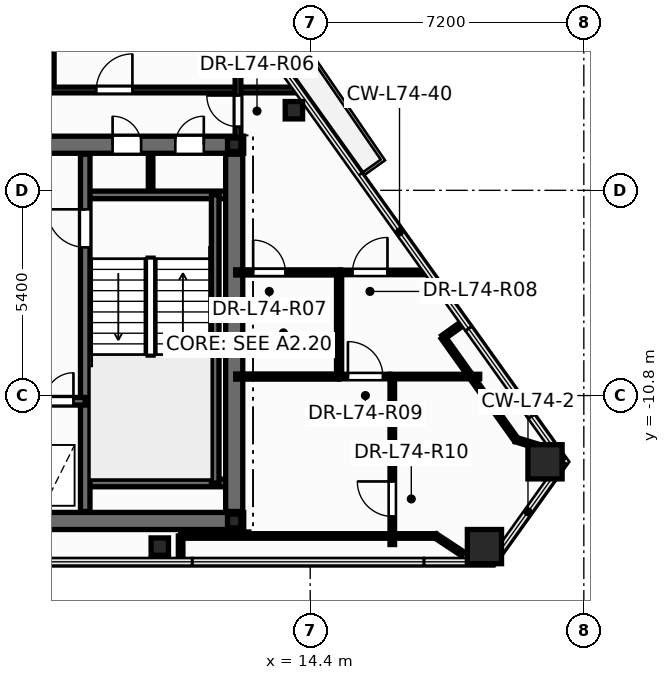
"""IFC4 building model, lengths in metres.
Left out: names, types, materials, properties, quantities, classifications, styles, units other than length and angle.
Written with IfcOpenShell. Run it as: python <this file> out.ifc"""

import sys

from ifc_helpers import new_model, si_unit, direction, frame, frame_2d, origin, origin_2d, place, context, subcontext, project, spatial, rectangle, hollow_rectangle, hollow_circle, i_section, extrude, element, fill, save


model = new_model("IFC4")
c1 = context("Model", 3, precision=1e-05, world=origin(), true_north=direction((0.0, 1.0)))
c2 = subcontext(c1, "Body", "Model", "MODEL_VIEW")
j1 = project(units=[si_unit("LENGTHUNIT", "METRE"), si_unit("PLANEANGLEUNIT", "RADIAN")], contexts=[c1])
p1 = place(None, origin())
s1 = spatial("IfcSite", under=j1, at=p1, CompositionType="ELEMENT")
p2 = place(p1, origin())
s2 = spatial("IfcBuilding", under=s1, at=p2, CompositionType="ELEMENT")
p3 = place(p2, frame((0.0, 0.0, 281.4)))
s3 = spatial("IfcBuildingStorey", under=s2, at=p3, CompositionType="ELEMENT", Elevation=281.4)
for number, where, z_axis, x_axis in (
    (1, (18.985, -14.774, 0.0), (0.0, 0.0, 1.0), (1.0, 0.0, 0.0)),
    (2, (20.579, -12.543, 0.0), (0.0, 0.0, 1.0), (1.0, 0.0, 0.0)),
):
    element("IfcColumn", number, at=place(p3, frame(where, z_axis=z_axis, x_axis=x_axis)), inside=s3, PredefinedType="COLUMN", context=c2, shape_type="SweptSolid", body=[
        extrude(hollow_rectangle(XDim=0.9, YDim=0.9, WallThickness=0.04, at=origin_2d()), origin(), (0.0, 0.0, 1.0), 3.6),
    ])
for number, where, z_axis, x_axis in (
    (3, (10.442, -14.774, 0.0), (0.0, 0.0, 1.0), (1.0, 0.0, 0.0)),
    (4, (13.97, -3.292, 0.0), (0.0, 0.0, 1.0), (1.0, 0.0, 0.0)),
):
    element("IfcColumn", number, at=place(p3, frame(where, z_axis=z_axis, x_axis=x_axis)), inside=s3, PredefinedType="COLUMN", context=c2, shape_type="SweptSolid", body=[
        extrude(hollow_circle(Radius=0.229, WallThickness=0.016, at=origin_2d()), origin(), (0.0, 0.0, 1.0), 3.6),
    ])
for number, where, z_axis, x_axis in (
    (5, (12.4, -14.1, 0.0), (0.0, 0.0, 1.0), (1.0, 0.0, 0.0)),
    (6, (12.4, -4.2, 0.0), (0.0, 0.0, 1.0), (1.0, 0.0, 0.0)),
):
    element("IfcColumn", number, at=place(p3, frame(where, z_axis=z_axis, x_axis=x_axis)), inside=s3, PredefinedType="COLUMN", context=c2, shape_type="SweptSolid", body=[
        extrude(i_section(OverallWidth=0.352, OverallDepth=0.359, WebThickness=0.018, FlangeThickness=0.026, at=origin_2d()), origin(), (0.0, 0.0, 1.0), 3.6),
    ])
p4 = place(p3, frame((10.2, -5.52, 0.0), z_axis=(0.0, 0.0, 1.0), x_axis=(0.0, 1.0, 0.0)))
e7 = element("IfcWall", 7, at=p4, inside=s3, PredefinedType="PARTITIONING", context=c2, shape_type="SweptSolid", body=[
    extrude(rectangle(XDim=1.12, YDim=0.12, at=frame_2d((0.56, 0.0))), origin(), (0.0, 0.0, 1.0), 3.32),
])
p5 = place(p3, frame((-12.65, -14.1, 0.0), z_axis=(0.0, 0.0, 1.0), x_axis=(1.0, 0.0, 0.0)))
e8 = element("IfcWall", 8, at=p5, inside=s3, PredefinedType="SHEAR", context=c2, shape_type="SweptSolid", body=[
    extrude(rectangle(XDim=25.3, YDim=0.45, at=frame_2d((12.65, 0.0))), origin(), (0.0, 0.0, 1.0), 3.6),
])
p6 = place(p3, frame((-12.65, -4.2, 0.0), z_axis=(0.0, 0.0, 1.0), x_axis=(1.0, 0.0, 0.0)))
e9 = element("IfcWall", 9, at=p6, inside=s3, PredefinedType="SHEAR", context=c2, shape_type="SweptSolid", body=[
    extrude(rectangle(XDim=25.3, YDim=0.45, at=frame_2d((12.65, 0.0))), origin(), (0.0, 0.0, 1.0), 3.6),
])
p7 = place(p6, frame((0.95, 0.0, 0.0)))
e10 = element("IfcOpeningElement", 10, at=p7, cuts=e9, PredefinedType="OPENING", context=c2, shape_type="SweptSolid", body=[
    extrude(rectangle(XDim=0.756, YDim=2.054, at=frame_2d((0.375, 1.027))), frame((0.0, 0.235, 0.0), z_axis=(0.0, -1.0, 0.0), x_axis=(1.0, 0.0, 0.0)), (0.0, 0.0, 1.0), 0.47),
])
p8 = place(p6, frame((2.6, 0.0, 0.0)))
e11 = element("IfcOpeningElement", 11, at=p8, cuts=e9, PredefinedType="OPENING", context=c2, shape_type="SweptSolid", body=[
    extrude(rectangle(XDim=0.756, YDim=2.054, at=frame_2d((0.375, 1.027))), frame((0.0, 0.235, 0.0), z_axis=(0.0, -1.0, 0.0), x_axis=(1.0, 0.0, 0.0)), (0.0, 0.0, 1.0), 0.47),
])
p9 = place(p6, frame((21.85, 0.0, 0.0)))
e12 = element("IfcOpeningElement", 12, at=p9, cuts=e9, PredefinedType="OPENING", context=c2, shape_type="SweptSolid", body=[
    extrude(rectangle(XDim=0.756, YDim=2.054, at=frame_2d((0.375, 1.027))), frame((0.0, 0.235, 0.0), z_axis=(0.0, -1.0, 0.0), x_axis=(1.0, 0.0, 0.0)), (0.0, 0.0, 1.0), 0.47),
])
p10 = place(p6, frame((23.5, 0.0, 0.0)))
e13 = element("IfcOpeningElement", 13, at=p10, cuts=e9, PredefinedType="OPENING", context=c2, shape_type="SweptSolid", body=[
    extrude(rectangle(XDim=0.756, YDim=2.054, at=frame_2d((0.375, 1.027))), frame((0.0, 0.235, 0.0), z_axis=(0.0, -1.0, 0.0), x_axis=(1.0, 0.0, 0.0)), (0.0, 0.0, 1.0), 0.47),
])
p11 = place(p6, frame((5.85, 0.0, 0.0)))
e14 = element("IfcOpeningElement", 14, at=p11, cuts=e9, PredefinedType="OPENING", context=c2, shape_type="SweptSolid", body=[
    extrude(rectangle(XDim=1.006, YDim=2.104, at=frame_2d((0.5, 1.052))), frame((0.0, 0.235, 0.0), z_axis=(0.0, -1.0, 0.0), x_axis=(1.0, 0.0, 0.0)), (0.0, 0.0, 1.0), 0.47),
])
p12 = place(p6, frame((10.35, 0.0, 0.0)))
e15 = element("IfcOpeningElement", 15, at=p12, cuts=e9, PredefinedType="OPENING", context=c2, shape_type="SweptSolid", body=[
    extrude(rectangle(XDim=1.406, YDim=2.154, at=frame_2d((0.7, 1.077))), frame((0.0, 0.235, 0.0), z_axis=(0.0, -1.0, 0.0), x_axis=(1.0, 0.0, 0.0)), (0.0, 0.0, 1.0), 0.47),
])
p13 = place(p6, frame((18.45, 0.0, 0.0)))
e16 = element("IfcOpeningElement", 16, at=p13, cuts=e9, PredefinedType="OPENING", context=c2, shape_type="SweptSolid", body=[
    extrude(rectangle(XDim=1.006, YDim=2.104, at=frame_2d((0.5, 1.052))), frame((0.0, 0.235, 0.0), z_axis=(0.0, -1.0, 0.0), x_axis=(1.0, 0.0, 0.0)), (0.0, 0.0, 1.0), 0.47),
])
for number, where, z_axis, x_axis in (
    (17, (8.48, -5.52, 0.0), (0.0, 0.0, 1.0), (1.0, 0.0, 0.0)),
    (18, (8.48, -13.1, 0.0), (0.0, 0.0, 1.0), (1.0, 0.0, 0.0)),
):
    element("IfcWall", number, at=place(p3, frame(where, z_axis=z_axis, x_axis=x_axis)), inside=s3, PredefinedType="SOLIDWALL", context=c2, shape_type="SweptSolid", body=[
        extrude(rectangle(XDim=3.87, YDim=0.2, at=frame_2d((1.935, 0.0))), origin(), (0.0, 0.0, 1.0), 3.6),
    ])
p14 = place(p3, frame((11.9, -13.1, 0.0), z_axis=(0.0, 0.0, 1.0), x_axis=(0.0, 1.0, 0.0)))
e19 = element("IfcWall", 19, at=p14, inside=s3, PredefinedType="SOLIDWALL", context=c2, shape_type="SweptSolid", body=[
    extrude(rectangle(XDim=7.58, YDim=0.2, at=frame_2d((3.79, 0.0))), origin(), (0.0, 0.0, 1.0), 3.6),
])
p15 = place(p3, frame((8.48, -13.85, 0.0), z_axis=(0.0, 0.0, 1.0), x_axis=(0.0, 1.0, 0.0)))
e20 = element("IfcWall", 20, at=p15, inside=s3, PredefinedType="SHEAR", context=c2, shape_type="SweptSolid", body=[
    extrude(rectangle(XDim=9.4, YDim=0.25, at=frame_2d((4.7, 0.0))), origin(), (0.0, 0.0, 1.0), 3.6),
])
p16 = place(p15, frame((6.95, 0.0, 0.0)))
e21 = element("IfcOpeningElement", 21, at=p16, cuts=e20, PredefinedType="OPENING", context=c2, shape_type="SweptSolid", body=[
    extrude(rectangle(XDim=1.006, YDim=2.104, at=frame_2d((0.5, 1.052))), frame((0.0, 0.135, 0.0), z_axis=(0.0, -1.0, 0.0), x_axis=(1.0, 0.0, 0.0)), (0.0, 0.0, 1.0), 0.27),
])
p17 = place(p3, frame((5.12, -10.95, 0.0), z_axis=(0.0, 0.0, 1.0), x_axis=(1.0, 0.0, 0.0)))
e22 = element("IfcWall", 22, at=p17, inside=s3, PredefinedType="SOLIDWALL", context=c2, shape_type="SweptSolid", body=[
    extrude(rectangle(XDim=3.36, YDim=0.2, at=frame_2d((1.68, 0.0))), origin(), (0.0, 0.0, 1.0), 3.6),
])
p18 = place(p17, frame((0.42, 0.0, 0.0)))
e23 = element("IfcOpeningElement", 23, at=p18, cuts=e22, PredefinedType="OPENING", context=c2, shape_type="SweptSolid", body=[
    extrude(rectangle(XDim=1.106, YDim=2.104, at=frame_2d((0.55, 1.052))), frame((0.0, 0.11, 0.0), z_axis=(0.0, -1.0, 0.0), x_axis=(1.0, 0.0, 0.0)), (0.0, 0.0, 1.0), 0.22),
])
p19 = place(p17, frame((2.3, 0.0, 0.0)))
e24 = element("IfcOpeningElement", 24, at=p19, cuts=e22, PredefinedType="OPENING", context=c2, shape_type="SweptSolid", body=[
    extrude(rectangle(XDim=0.756, YDim=2.054, at=frame_2d((0.375, 1.027))), frame((0.0, 0.11, 0.0), z_axis=(0.0, -1.0, 0.0), x_axis=(1.0, 0.0, 0.0)), (0.0, 0.0, 1.0), 0.22),
])
p20 = place(p3, frame((12.4, -13.85, 0.0), z_axis=(0.0, 0.0, 1.0), x_axis=(0.0, 1.0, 0.0)))
e25 = element("IfcWall", 25, at=p20, inside=s3, PredefinedType="SHEAR", context=c2, shape_type="SweptSolid", body=[
    extrude(rectangle(XDim=9.4, YDim=0.45, at=frame_2d((4.7, 0.0))), origin(), (0.0, 0.0, 1.0), 3.6),
])
p21 = place(p3, frame((7.6, -2.76, 0.0), z_axis=(0.0, 0.0, 1.0), x_axis=(0.0, 1.0, 0.0)))
e26 = element("IfcWall", 26, at=p21, inside=s3, PredefinedType="PARTITIONING", context=c2, shape_type="SweptSolid", body=[
    extrude(rectangle(XDim=9.075, YDim=0.12, at=frame_2d((4.538, 0.0))), origin(), (0.0, 0.0, 1.0), 2.693),
])
p22 = place(p3, frame((10.99, -14.494, 0.0), z_axis=(0.0, 0.0, 1.0), x_axis=(1.0, 0.0, 0.0)))
e27 = element("IfcWall", 27, at=p22, inside=s3, PredefinedType="PARTITIONING", context=c2, shape_type="SweptSolid", body=[
    extrude(rectangle(XDim=6.712, YDim=0.12, at=frame_2d((3.356, 0.0))), origin(), (0.0, 0.0, 1.0), 2.838),
])
p23 = place(p3, frame((7.54, -2.76, 0.0), z_axis=(0.0, 0.0, 1.0), x_axis=(1.0, 0.0, 0.0)))
e28 = element("IfcWall", 28, at=p23, inside=s3, PredefinedType="PARTITIONING", context=c2, shape_type="SweptSolid", body=[
    extrude(rectangle(XDim=6.542, YDim=0.15, at=frame_2d((3.271, 0.0))), origin(), (0.0, 0.0, 1.0), 2.693),
])
p24 = place(p23, frame((1.231, 0.0, 0.0)))
e29 = element("IfcOpeningElement", 29, at=p24, cuts=e28, PredefinedType="OPENING", context=c2, shape_type="SweptSolid", body=[
    extrude(rectangle(XDim=0.956, YDim=2.104, at=frame_2d((0.475, 1.052))), frame((0.0, 0.085, 0.0), z_axis=(0.0, -1.0, 0.0), x_axis=(1.0, 0.0, 0.0)), (0.0, 0.0, 1.0), 0.17),
])
p25 = place(p3, frame((16.56, -14.72, 0.0), z_axis=(0.0, 0.0, 1.0), x_axis=(0.0, 1.0, 0.0)))
e30 = element("IfcWall", 30, at=p25, inside=s3, PredefinedType="PARTITIONING", context=c2, shape_type="SweptSolid", body=[
    extrude(rectangle(XDim=4.42, YDim=0.12, at=frame_2d((2.21, 0.0))), origin(), (0.0, 0.0, 1.0), 3.32),
])
p26 = place(p25, frame((0.74, 0.0, 0.0)))
e31 = element("IfcOpeningElement", 31, at=p26, cuts=e30, PredefinedType="OPENING", context=c2, shape_type="SweptSolid", body=[
    extrude(rectangle(XDim=0.926, YDim=2.104, at=frame_2d((0.46, 1.052))), frame((0.0, 0.07, 0.0), z_axis=(0.0, -1.0, 0.0), x_axis=(1.0, 0.0, 0.0)), (0.0, 0.0, 1.0), 0.14),
])
p27 = place(p3, frame((12.5, -4.24, 0.0), z_axis=(0.0, 0.0, 1.0), x_axis=(0.0, 1.0, 0.0)))
e32 = element("IfcWall", 32, at=p27, inside=s3, PredefinedType="PARTITIONING", context=c2, shape_type="SweptSolid", body=[
    extrude(rectangle(XDim=3.695, YDim=0.15, at=frame_2d((1.848, 0.0))), origin(), (0.0, 0.0, 1.0), 2.295),
])
p28 = place(p27, frame((0.516, 0.0, 0.0)))
e33 = element("IfcOpeningElement", 33, at=p28, cuts=e32, PredefinedType="OPENING", context=c2, shape_type="SweptSolid", body=[
    extrude(rectangle(XDim=0.826, YDim=2.104, at=frame_2d((0.41, 1.052))), frame((0.0, 0.085, 0.0), z_axis=(0.0, -1.0, 0.0), x_axis=(1.0, 0.0, 0.0)), (0.0, 0.0, 1.0), 0.17),
])
p29 = place(p3, frame((19.82, -11.962, 0.0), z_axis=(0.0, 0.0, 1.0), x_axis=(-0.581300979527, 0.813688620543, 0.0)))
e34 = element("IfcWall", 34, at=p29, inside=s3, PredefinedType="PARTITIONING", context=c2, shape_type="SweptSolid", body=[
    extrude(rectangle(XDim=3.31, YDim=0.12, at=frame_2d((1.655, 0.0))), origin(), (0.0, 0.0, 1.0), 2.295),
])
p30 = place(p3, frame((12.44, -7.56, 0.0), z_axis=(0.0, 0.0, 1.0), x_axis=(1.0, 0.0, 0.0)))
e35 = element("IfcWall", 35, at=p30, inside=s3, PredefinedType="PARTITIONING", context=c2, shape_type="SweptSolid", body=[
    extrude(rectangle(XDim=2.76, YDim=0.135, at=frame_2d((1.38, 0.0))), origin(), (0.0, 0.0, 1.0), 2.838),
])
p31 = place(p30, frame((0.458, 0.0, 0.0)))
e36 = element("IfcOpeningElement", 36, at=p31, cuts=e35, PredefinedType="OPENING", context=c2, shape_type="SweptSolid", body=[
    extrude(rectangle(XDim=0.856, YDim=2.104, at=frame_2d((0.425, 1.052))), frame((0.0, 0.078, 0.0), z_axis=(0.0, -1.0, 0.0), x_axis=(1.0, 0.0, 0.0)), (0.0, 0.0, 1.0), 0.155),
])
p32 = place(p3, frame((15.16, -10.3, 0.0), z_axis=(0.0, 0.0, 1.0), x_axis=(0.0, 1.0, 0.0)))
e37 = element("IfcWall", 37, at=p32, inside=s3, PredefinedType="PARTITIONING", context=c2, shape_type="SweptSolid", body=[
    extrude(rectangle(XDim=2.74, YDim=0.135, at=frame_2d((1.37, 0.0))), origin(), (0.0, 0.0, 1.0), 3.32),
])
p33 = place(p3, frame((12.44, -10.3, 0.0), z_axis=(0.0, 0.0, 1.0), x_axis=(1.0, 0.0, 0.0)))
e38 = element("IfcWall", 38, at=p33, inside=s3, PredefinedType="PARTITIONING", context=c2, shape_type="SweptSolid", body=[
    extrude(rectangle(XDim=2.72, YDim=0.135, at=frame_2d((1.36, 0.0))), origin(), (0.0, 0.0, 1.0), 2.838),
])
p34 = place(p3, frame((15.202, -7.56, 0.0), z_axis=(0.0, 0.0, 1.0), x_axis=(1.0, 0.0, 0.0)))
e39 = element("IfcWall", 39, at=p34, inside=s3, PredefinedType="PARTITIONING", context=c2, shape_type="SweptSolid", body=[
    extrude(rectangle(XDim=2.309, YDim=0.12, at=frame_2d((1.155, 0.0))), origin(), (0.0, 0.0, 1.0), 2.295),
])
p35 = place(p34, frame((0.311, 0.0, 0.0)))
e40 = element("IfcOpeningElement", 40, at=p35, cuts=e39, PredefinedType="OPENING", context=c2, shape_type="SweptSolid", body=[
    extrude(rectangle(XDim=0.926, YDim=2.104, at=frame_2d((0.46, 1.052))), frame((0.0, 0.07, 0.0), z_axis=(0.0, -1.0, 0.0), x_axis=(1.0, 0.0, 0.0)), (0.0, 0.0, 1.0), 0.14),
])
p36 = place(p3, frame((16.5, -10.3, 0.0), z_axis=(0.0, 0.0, 1.0), x_axis=(1.0, 0.0, 0.0)))
e41 = element("IfcWall", 41, at=p36, inside=s3, PredefinedType="PARTITIONING", context=c2, shape_type="SweptSolid", body=[
    extrude(rectangle(XDim=2.36, YDim=0.12, at=frame_2d((1.18, 0.0))), origin(), (0.0, 0.0, 1.0), 2.295),
])
p37 = place(p3, frame((15.16, -10.3, 0.0), z_axis=(0.0, 0.0, 1.0), x_axis=(1.0, 0.0, 0.0)))
e42 = element("IfcWall", 42, at=p37, inside=s3, PredefinedType="PARTITIONING", context=c2, shape_type="SweptSolid", body=[
    extrude(rectangle(XDim=1.338, YDim=0.12, at=frame_2d((0.669, 0.0))), origin(), (0.0, 0.0, 1.0), 3.32),
])
p38 = place(p37, frame((0.232, 0.0, 0.0)))
e43 = element("IfcOpeningElement", 43, at=p38, cuts=e42, PredefinedType="OPENING", context=c2, shape_type="SweptSolid", body=[
    extrude(rectangle(XDim=0.926, YDim=2.104, at=frame_2d((0.46, 1.052))), frame((0.0, 0.07, 0.0), z_axis=(0.0, -1.0, 0.0), x_axis=(1.0, 0.0, 0.0)), (0.0, 0.0, 1.0), 0.14),
])
p39 = place(p3, frame((17.701, -14.494, 0.0), z_axis=(0.0, 0.0, 1.0), x_axis=(0.83506849916, -0.550145982182, 0.0)))
e44 = element("IfcWall", 44, at=p39, inside=s3, PredefinedType="PARTITIONING", context=c2, shape_type="SweptSolid", body=[
    extrude(rectangle(XDim=0.855, YDim=0.12, at=frame_2d((0.428, 0.0))), origin(), (0.0, 0.0, 1.0), 2.838),
])
p40 = place(p3, frame((20.636, -12.212, 0.0), z_axis=(0.0, 0.0, 1.0), x_axis=(-0.956124750871, 0.292959827915, 0.0)))
e45 = element("IfcWall", 45, at=p40, inside=s3, PredefinedType="PARTITIONING", context=c2, shape_type="SweptSolid", body=[
    extrude(rectangle(XDim=0.853, YDim=0.12, at=frame_2d((0.427, 0.0))), origin(), (0.0, 0.0, 1.0), 2.295),
])
p41 = place(p3, frame((10.99, -15.164, 0.0), z_axis=(0.0, 0.0, 1.0), x_axis=(0.0, 1.0, 0.0)))
e46 = element("IfcWall", 46, at=p41, inside=s3, PredefinedType="PARTITIONING", context=c2, shape_type="SweptSolid", body=[
    extrude(rectangle(XDim=0.67, YDim=0.12, at=frame_2d((0.335, 0.0))), origin(), (0.0, 0.0, 1.0), 2.838),
])
p42 = place(p3, frame((17.896, -9.268, 0.0), z_axis=(0.0, 0.0, 1.0), x_axis=(0.81385652885, 0.581065874448, 0.0)))
e47 = element("IfcWall", 47, at=p42, inside=s3, PredefinedType="PARTITIONING", context=c2, shape_type="SweptSolid", body=[
    extrude(rectangle(XDim=0.67, YDim=0.12, at=frame_2d((0.335, 0.0))), origin(), (0.0, 0.0, 1.0), 2.838),
])
p43 = place(p16, origin())
e48 = element("IfcDoor", 48, at=p43, inside=s3, OperationType="SINGLE_SWING_RIGHT", PredefinedType="DOOR", context=c2, shape_type="SweptSolid", body=[
    extrude(rectangle(XDim=1.0, YDim=2.1, at=frame_2d((0.5, 1.05))), frame((0.0, 0.025, 0.0), z_axis=(0.0, -1.0, 0.0), x_axis=(1.0, 0.0, 0.0)), (0.0, 0.0, 1.0), 0.05),
])
fill(e21, e48)
p44 = place(p19, origin())
e49 = element("IfcDoor", 49, at=p44, inside=s3, OperationType="SINGLE_SWING_RIGHT", PredefinedType="DOOR", context=c2, shape_type="SweptSolid", body=[
    extrude(rectangle(XDim=0.75, YDim=2.05, at=frame_2d((0.375, 1.025))), frame((0.0, 0.025, 0.0), z_axis=(0.0, -1.0, 0.0), x_axis=(1.0, 0.0, 0.0)), (0.0, 0.0, 1.0), 0.05),
])
fill(e24, e49)
p45 = place(p9, origin())
e50 = element("IfcDoor", 50, at=p45, inside=s3, OperationType="SINGLE_SWING_LEFT", PredefinedType="DOOR", context=c2, shape_type="SweptSolid", body=[
    extrude(rectangle(XDim=0.75, YDim=2.05, at=frame_2d((0.375, 1.025))), frame((0.0, 0.025, 0.0), z_axis=(0.0, -1.0, 0.0), x_axis=(1.0, 0.0, 0.0)), (0.0, 0.0, 1.0), 0.05),
])
fill(e12, e50)
p46 = place(p10, origin())
e51 = element("IfcDoor", 51, at=p46, inside=s3, OperationType="SINGLE_SWING_RIGHT", PredefinedType="DOOR", context=c2, shape_type="SweptSolid", body=[
    extrude(rectangle(XDim=0.75, YDim=2.05, at=frame_2d((0.375, 1.025))), frame((0.0, 0.025, 0.0), z_axis=(0.0, -1.0, 0.0), x_axis=(1.0, 0.0, 0.0)), (0.0, 0.0, 1.0), 0.05),
])
fill(e13, e51)
p47 = place(p28, origin())
e52 = element("IfcDoor", 52, at=p47, inside=s3, OperationType="SINGLE_SWING_RIGHT", PredefinedType="DOOR", context=c2, shape_type="SweptSolid", body=[
    extrude(rectangle(XDim=0.82, YDim=2.1, at=frame_2d((0.41, 1.05))), frame((0.0, 0.025, 0.0), z_axis=(0.0, -1.0, 0.0), x_axis=(1.0, 0.0, 0.0)), (0.0, 0.0, 1.0), 0.05),
])
fill(e33, e52)
p48 = place(p31, origin())
e53 = element("IfcDoor", 53, at=p48, inside=s3, OperationType="SINGLE_SWING_LEFT", PredefinedType="DOOR", context=c2, shape_type="SweptSolid", body=[
    extrude(rectangle(XDim=0.85, YDim=2.1, at=frame_2d((0.425, 1.05))), frame((0.0, 0.025, 0.0), z_axis=(0.0, -1.0, 0.0), x_axis=(1.0, 0.0, 0.0)), (0.0, 0.0, 1.0), 0.05),
])
fill(e36, e53)
p49 = place(p35, origin())
e54 = element("IfcDoor", 54, at=p49, inside=s3, OperationType="SINGLE_SWING_RIGHT", PredefinedType="DOOR", context=c2, shape_type="SweptSolid", body=[
    extrude(rectangle(XDim=0.92, YDim=2.1, at=frame_2d((0.46, 1.05))), frame((0.0, 0.025, 0.0), z_axis=(0.0, -1.0, 0.0), x_axis=(1.0, 0.0, 0.0)), (0.0, 0.0, 1.0), 0.05),
])
fill(e40, e54)
p50 = place(p38, origin())
e55 = element("IfcDoor", 55, at=p50, inside=s3, OperationType="SINGLE_SWING_LEFT", PredefinedType="DOOR", context=c2, shape_type="SweptSolid", body=[
    extrude(rectangle(XDim=0.92, YDim=2.1, at=frame_2d((0.46, 1.05))), frame((0.0, 0.025, 0.0), z_axis=(0.0, -1.0, 0.0), x_axis=(1.0, 0.0, 0.0)), (0.0, 0.0, 1.0), 0.05),
])
fill(e43, e55)
p51 = place(p26, origin())
e56 = element("IfcDoor", 56, at=p51, inside=s3, OperationType="SINGLE_SWING_RIGHT", PredefinedType="DOOR", context=c2, shape_type="SweptSolid", body=[
    extrude(rectangle(XDim=0.92, YDim=2.1, at=frame_2d((0.46, 1.05))), frame((0.0, 0.025, 0.0), z_axis=(0.0, -1.0, 0.0), x_axis=(1.0, 0.0, 0.0)), (0.0, 0.0, 1.0), 0.05),
])
fill(e31, e56)
p52 = place(p24, origin())
e57 = element("IfcDoor", 57, at=p52, inside=s3, OperationType="SINGLE_SWING_RIGHT", PredefinedType="DOOR", context=c2, shape_type="SweptSolid", body=[
    extrude(rectangle(XDim=0.95, YDim=2.1, at=frame_2d((0.475, 1.05))), frame((0.0, 0.025, 0.0), z_axis=(0.0, -1.0, 0.0), x_axis=(1.0, 0.0, 0.0)), (0.0, 0.0, 1.0), 0.05),
])
fill(e29, e57)
save(model, sys.argv[1])
